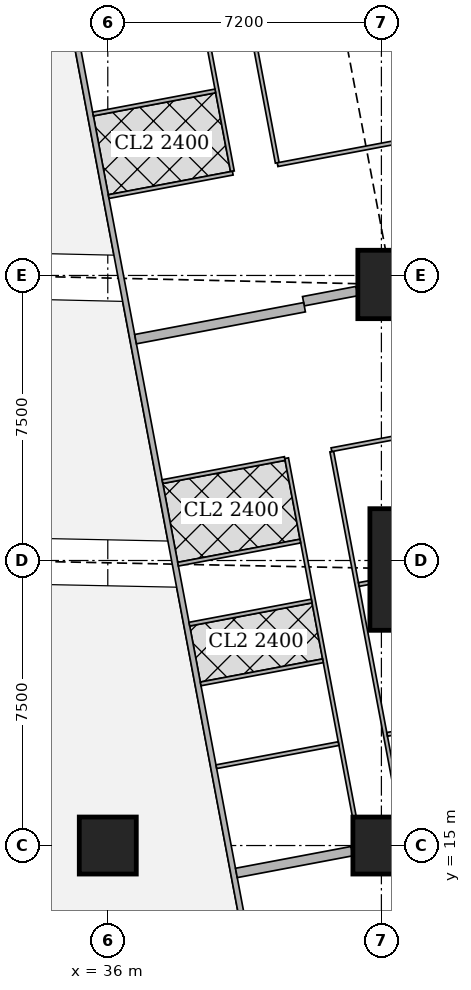
"""IFC4 building model, lengths in metres.
Left out: names, types, materials, properties, quantities, classifications, styles, units other than length and angle.
Written with IfcOpenShell. Run it as: python <this file> out.ifc"""

import sys

from ifc_helpers import new_model, si_unit, direction, frame, frame_2d, origin, origin_2d, place, context, subcontext, project, spatial, rectangle, extrude, element, fill, save


model = new_model("IFC4")
c1 = context("Model", 3, precision=1e-05, world=origin(), true_north=direction((0.0, 1.0)))
c2 = subcontext(c1, "Body", "Model", "MODEL_VIEW")
j1 = project(units=[si_unit("LENGTHUNIT", "METRE"), si_unit("PLANEANGLEUNIT", "RADIAN")], contexts=[c1])
p1 = place(None, origin())
s1 = spatial("IfcSite", under=j1, at=p1, CompositionType="ELEMENT")
p2 = place(p1, origin())
s2 = spatial("IfcBuilding", under=s1, at=p2, CompositionType="ELEMENT")
p3 = place(p2, frame((0.0, 0.0, 147.05)))
s3 = spatial("IfcBuildingStorey", under=s2, at=p3, CompositionType="ELEMENT", Elevation=147.05)
for number, where, z_axis, x_axis in (
    (1, (36.0, 15.0, 0.0), (0.0, 0.0, 1.0), (1.0, 0.0, 0.0)),
    (2, (43.2, 15.0, 0.0), (0.0, 0.0, 1.0), (1.0, 0.0, 0.0)),
):
    element("IfcColumn", number, at=place(p3, frame(where, z_axis=z_axis, x_axis=x_axis)), inside=s3, PredefinedType="COLUMN", context=c2, shape_type="SweptSolid", body=[
        extrude(rectangle(XDim=1.5, YDim=1.5, at=origin_2d()), origin(), (0.0, 0.0, 1.0), 3.75),
    ])
p4 = place(p3, frame((44.697, 22.263, 0.0), z_axis=(0.0, 0.0, 1.0), x_axis=(1.0, 0.0, 0.0)))
e3 = element("IfcColumn", 3, at=p4, inside=s3, PredefinedType="COLUMN", context=c2, shape_type="SweptSolid", body=[
    extrude(rectangle(XDim=3.6, YDim=3.2, at=origin_2d()), origin(), (0.0, 0.0, 1.0), 3.75),
])
p5 = place(p3, frame((43.48, 29.763, 0.0), z_axis=(0.0, 0.0, 1.0), x_axis=(1.0, 0.0, 0.0)))
e4 = element("IfcColumn", 4, at=p5, inside=s3, PredefinedType="COLUMN", context=c2, shape_type="SweptSolid", body=[
    extrude(rectangle(XDim=1.8, YDim=1.8, at=origin_2d()), origin(), (0.0, 0.0, 1.0), 3.75),
])
p6 = place(p3, frame((50.653, 2.703, 0.0), z_axis=(0.0, 0.0, 1.0), x_axis=(-0.185612026696, 0.982623109613, 0.0)))
e5 = element("IfcWall", 5, at=p6, inside=s3, PredefinedType="SOLIDWALL", context=c2, shape_type="SweptSolid", body=[
    extrude(rectangle(XDim=41.393, YDim=0.2, at=frame_2d((20.697, 0.0))), origin(), (0.0, 0.0, 1.0), 3.5),
])
p7 = place(p6, frame((1.633, 0.0, 0.9)))
e6 = element("IfcOpeningElement", 6, at=p7, cuts=e5, PredefinedType="OPENING", context=c2, shape_type="SweptSolid", body=[
    extrude(rectangle(XDim=1.8, YDim=1.5, at=frame_2d((0.9, 0.75))), frame((0.0, 0.11, 0.0), z_axis=(0.0, -1.0, 0.0), x_axis=(1.0, 0.0, 0.0)), (0.0, 0.0, 1.0), 0.22),
])
p8 = place(p6, frame((6.032, 0.0, 0.9)))
e7 = element("IfcOpeningElement", 7, at=p8, cuts=e5, PredefinedType="OPENING", context=c2, shape_type="SweptSolid", body=[
    extrude(rectangle(XDim=1.8, YDim=1.5, at=frame_2d((0.9, 0.75))), frame((0.0, 0.11, 0.0), z_axis=(0.0, -1.0, 0.0), x_axis=(1.0, 0.0, 0.0)), (0.0, 0.0, 1.0), 0.22),
])
p9 = place(p6, frame((9.848, 0.0, 0.9)))
e8 = element("IfcOpeningElement", 8, at=p9, cuts=e5, PredefinedType="OPENING", context=c2, shape_type="SweptSolid", body=[
    extrude(rectangle(XDim=1.8, YDim=1.5, at=frame_2d((0.9, 0.75))), frame((0.0, 0.11, 0.0), z_axis=(0.0, -1.0, 0.0), x_axis=(1.0, 0.0, 0.0)), (0.0, 0.0, 1.0), 0.22),
])
p10 = place(p6, frame((13.664, 0.0, 0.9)))
e9 = element("IfcOpeningElement", 9, at=p10, cuts=e5, PredefinedType="OPENING", context=c2, shape_type="SweptSolid", body=[
    extrude(rectangle(XDim=1.8, YDim=1.5, at=frame_2d((0.9, 0.75))), frame((0.0, 0.11, 0.0), z_axis=(0.0, -1.0, 0.0), x_axis=(1.0, 0.0, 0.0)), (0.0, 0.0, 1.0), 0.22),
])
p11 = place(p6, frame((17.481, 0.0, 0.9)))
e10 = element("IfcOpeningElement", 10, at=p11, cuts=e5, PredefinedType="OPENING", context=c2, shape_type="SweptSolid", body=[
    extrude(rectangle(XDim=1.8, YDim=1.5, at=frame_2d((0.9, 0.75))), frame((0.0, 0.11, 0.0), z_axis=(0.0, -1.0, 0.0), x_axis=(1.0, 0.0, 0.0)), (0.0, 0.0, 1.0), 0.22),
])
p12 = place(p6, frame((21.297, 0.0, 0.9)))
e11 = element("IfcOpeningElement", 11, at=p12, cuts=e5, PredefinedType="OPENING", context=c2, shape_type="SweptSolid", body=[
    extrude(rectangle(XDim=1.8, YDim=1.5, at=frame_2d((0.9, 0.75))), frame((0.0, 0.11, 0.0), z_axis=(0.0, -1.0, 0.0), x_axis=(1.0, 0.0, 0.0)), (0.0, 0.0, 1.0), 0.22),
])
p13 = place(p6, frame((25.113, 0.0, 0.9)))
e12 = element("IfcOpeningElement", 12, at=p13, cuts=e5, PredefinedType="OPENING", context=c2, shape_type="SweptSolid", body=[
    extrude(rectangle(XDim=1.8, YDim=1.5, at=frame_2d((0.9, 0.75))), frame((0.0, 0.11, 0.0), z_axis=(0.0, -1.0, 0.0), x_axis=(1.0, 0.0, 0.0)), (0.0, 0.0, 1.0), 0.22),
])
p14 = place(p6, frame((28.93, 0.0, 0.9)))
e13 = element("IfcOpeningElement", 13, at=p14, cuts=e5, PredefinedType="OPENING", context=c2, shape_type="SweptSolid", body=[
    extrude(rectangle(XDim=1.8, YDim=1.5, at=frame_2d((0.9, 0.75))), frame((0.0, 0.11, 0.0), z_axis=(0.0, -1.0, 0.0), x_axis=(1.0, 0.0, 0.0)), (0.0, 0.0, 1.0), 0.22),
])
p15 = place(p6, frame((32.746, 0.0, 0.9)))
e14 = element("IfcOpeningElement", 14, at=p15, cuts=e5, PredefinedType="OPENING", context=c2, shape_type="SweptSolid", body=[
    extrude(rectangle(XDim=1.8, YDim=1.5, at=frame_2d((0.9, 0.75))), frame((0.0, 0.11, 0.0), z_axis=(0.0, -1.0, 0.0), x_axis=(1.0, 0.0, 0.0)), (0.0, 0.0, 1.0), 0.22),
])
p16 = place(p6, frame((36.481, 0.0, 0.9)))
e15 = element("IfcOpeningElement", 15, at=p16, cuts=e5, PredefinedType="OPENING", context=c2, shape_type="SweptSolid", body=[
    extrude(rectangle(XDim=1.8, YDim=1.5, at=frame_2d((0.9, 0.75))), frame((0.0, 0.11, 0.0), z_axis=(0.0, -1.0, 0.0), x_axis=(1.0, 0.0, 0.0)), (0.0, 0.0, 1.0), 0.22),
])
p17 = place(p3, frame((33.877, 43.029, 0.0), z_axis=(0.0, 0.0, 1.0), x_axis=(0.185596841028, -0.98262597798, 0.0)))
e16 = element("IfcWall", 16, at=p17, inside=s3, PredefinedType="SOLIDWALL", context=c2, shape_type="SweptSolid", body=[
    extrude(rectangle(XDim=41.66, YDim=0.15, at=frame_2d((20.83, 0.0))), origin(), (0.0, 0.0, 1.0), 2.5),
])
p18 = place(p17, frame((12.57, 0.0, 0.0)))
e17 = element("IfcOpeningElement", 17, at=p18, cuts=e16, PredefinedType="OPENING", context=c2, shape_type="SweptSolid", body=[
    extrude(rectangle(XDim=1.0, YDim=2.1, at=frame_2d((0.5, 1.05))), frame((0.0, 0.085, 0.0), z_axis=(0.0, -1.0, 0.0), x_axis=(1.0, 0.0, 0.0)), (0.0, 0.0, 1.0), 0.17),
])
p19 = place(p17, frame((16.386, 0.0, 0.0)))
e18 = element("IfcOpeningElement", 18, at=p19, cuts=e16, PredefinedType="OPENING", context=c2, shape_type="SweptSolid", body=[
    extrude(rectangle(XDim=1.0, YDim=2.1, at=frame_2d((0.5, 1.05))), frame((0.0, 0.085, 0.0), z_axis=(0.0, -1.0, 0.0), x_axis=(1.0, 0.0, 0.0)), (0.0, 0.0, 1.0), 0.17),
])
p20 = place(p17, frame((31.166, 0.0, 0.0)))
e19 = element("IfcOpeningElement", 19, at=p20, cuts=e16, PredefinedType="OPENING", context=c2, shape_type="SweptSolid", body=[
    extrude(rectangle(XDim=1.0, YDim=2.1, at=frame_2d((0.5, 1.05))), frame((0.0, 0.085, 0.0), z_axis=(0.0, -1.0, 0.0), x_axis=(1.0, 0.0, 0.0)), (0.0, 0.0, 1.0), 0.17),
])
p21 = place(p3, frame((38.701, 42.27, 0.0), z_axis=(0.0, 0.0, 1.0), x_axis=(0.185634707842, -0.982618825, 0.0)))
e20 = element("IfcWall", 20, at=p21, inside=s3, PredefinedType="PARTITIONING", context=c2, shape_type="SweptSolid", body=[
    extrude(rectangle(XDim=9.47, YDim=0.1, at=frame_2d((4.735, 0.0))), origin(), (0.0, 0.0, 1.0), 3.5),
])
p22 = place(p21, frame((8.42, 0.0, 0.0)))
e21 = element("IfcOpeningElement", 21, at=p22, cuts=e20, PredefinedType="OPENING", context=c2, shape_type="SweptSolid", body=[
    extrude(rectangle(XDim=0.9, YDim=2.1, at=frame_2d((0.45, 1.05))), frame((0.0, 0.06, 0.0), z_axis=(0.0, -1.0, 0.0), x_axis=(1.0, 0.0, 0.0)), (0.0, 0.0, 1.0), 0.12),
])
p23 = place(p21, frame((4.444, 0.0, 0.0)))
e22 = element("IfcOpeningElement", 22, at=p23, cuts=e20, PredefinedType="OPENING", context=c2, shape_type="SweptSolid", body=[
    extrude(rectangle(XDim=0.9, YDim=2.1, at=frame_2d((0.45, 1.05))), frame((0.0, 0.06, 0.0), z_axis=(0.0, -1.0, 0.0), x_axis=(1.0, 0.0, 0.0)), (0.0, 0.0, 1.0), 0.12),
])
p24 = place(p3, frame((37.411, 42.638, 0.0), z_axis=(0.0, 0.0, 1.0), x_axis=(0.185485587071, -0.982646984928, 0.0)))
e23 = element("IfcWall", 23, at=p24, inside=s3, PredefinedType="PARTITIONING", context=c2, shape_type="SweptSolid", body=[
    extrude(rectangle(XDim=10.072, YDim=0.1, at=frame_2d((5.036, 0.0))), origin(), (0.0, 0.0, 1.0), 3.5),
])
p25 = place(p24, frame((8.567, 0.0, 0.0)))
e24 = element("IfcOpeningElement", 24, at=p25, cuts=e23, PredefinedType="OPENING", context=c2, shape_type="SweptSolid", body=[
    extrude(rectangle(XDim=0.9, YDim=2.1, at=frame_2d((0.45, 1.05))), frame((0.0, 0.06, 0.0), z_axis=(0.0, -1.0, 0.0), x_axis=(1.0, 0.0, 0.0)), (0.0, 0.0, 1.0), 0.12),
])
p26 = place(p24, frame((3.188, 0.0, 0.0)))
e25 = element("IfcOpeningElement", 25, at=p26, cuts=e23, PredefinedType="OPENING", context=c2, shape_type="SweptSolid", body=[
    extrude(rectangle(XDim=0.9, YDim=2.1, at=frame_2d((0.45, 1.05))), frame((0.0, 0.06, 0.0), z_axis=(0.0, -1.0, 0.0), x_axis=(1.0, 0.0, 0.0)), (0.0, 0.0, 1.0), 0.12),
])
p27 = place(p24, frame((1.129, 0.0, 0.0)))
e26 = element("IfcOpeningElement", 26, at=p27, cuts=e23, PredefinedType="OPENING", context=c2, shape_type="SweptSolid", body=[
    extrude(rectangle(XDim=0.9, YDim=2.1, at=frame_2d((0.45, 1.05))), frame((0.0, 0.06, 0.0), z_axis=(0.0, -1.0, 0.0), x_axis=(1.0, 0.0, 0.0)), (0.0, 0.0, 1.0), 0.12),
])
p28 = place(p24, frame((5.899, 0.0, 0.0)))
e27 = element("IfcOpeningElement", 27, at=p28, cuts=e23, PredefinedType="OPENING", context=c2, shape_type="SweptSolid", body=[
    extrude(rectangle(XDim=0.9, YDim=2.1, at=frame_2d((0.45, 1.05))), frame((0.0, 0.06, 0.0), z_axis=(0.0, -1.0, 0.0), x_axis=(1.0, 0.0, 0.0)), (0.0, 0.0, 1.0), 0.12),
])
p29 = place(p3, frame((44.693, 33.713, 0.0), z_axis=(0.0, 0.0, 1.0), x_axis=(-0.982633535512, -0.185556823879, 0.0)))
e28 = element("IfcWall", 28, at=p29, inside=s3, PredefinedType="PARTITIONING", context=c2, shape_type="SweptSolid", body=[
    extrude(rectangle(XDim=4.3, YDim=0.1, at=frame_2d((2.15, 0.0))), origin(), (0.0, 0.0, 1.0), 2.1),
])
p30 = place(p3, frame((39.289, 32.692, 0.0), z_axis=(0.0, 0.0, 1.0), x_axis=(-0.982633623707, -0.185556356831, 0.0)))
e29 = element("IfcWall", 29, at=p30, inside=s3, PredefinedType="PARTITIONING", context=c2, shape_type="SweptSolid", body=[
    extrude(rectangle(XDim=3.325, YDim=0.1, at=frame_2d((1.663, 0.0))), origin(), (0.0, 0.0, 1.0), 3.5),
])
p31 = place(p3, frame((38.829, 34.855, 0.0), z_axis=(0.0, 0.0, 1.0), x_axis=(-0.982610347627, -0.185679575441, 0.0)))
e30 = element("IfcWall", 30, at=p31, inside=s3, PredefinedType="PARTITIONING", context=c2, shape_type="SweptSolid", body=[
    extrude(rectangle(XDim=3.274, YDim=0.1, at=frame_2d((1.637, 0.0))), origin(), (0.0, 0.0, 1.0), 3.5),
])
p32 = place(p3, frame((41.894, 25.366, 0.0), z_axis=(0.0, 0.0, 1.0), x_axis=(0.1856544654, -0.982615092229, 0.0)))
e31 = element("IfcWall", 31, at=p32, inside=s3, PredefinedType="PARTITIONING", context=c2, shape_type="SweptSolid", body=[
    extrude(rectangle(XDim=9.776, YDim=0.1, at=frame_2d((4.888, 0.0))), origin(), (0.0, 0.0, 1.0), 2.5),
])
p33 = place(p32, frame((0.151, 0.0, 0.0)))
e32 = element("IfcOpeningElement", 32, at=p33, cuts=e31, PredefinedType="OPENING", context=c2, shape_type="SweptSolid", body=[
    extrude(rectangle(XDim=0.9, YDim=2.1, at=frame_2d((0.45, 1.05))), frame((0.0, 0.06, 0.0), z_axis=(0.0, -1.0, 0.0), x_axis=(1.0, 0.0, 0.0)), (0.0, 0.0, 1.0), 0.12),
])
p34 = place(p32, frame((5.05, 0.0, 0.0)))
e33 = element("IfcOpeningElement", 33, at=p34, cuts=e31, PredefinedType="OPENING", context=c2, shape_type="SweptSolid", body=[
    extrude(rectangle(XDim=0.9, YDim=2.1, at=frame_2d((0.45, 1.05))), frame((0.0, 0.06, 0.0), z_axis=(0.0, -1.0, 0.0), x_axis=(1.0, 0.0, 0.0)), (0.0, 0.0, 1.0), 0.12),
])
p35 = place(p32, frame((7.783, 0.0, 0.0)))
e34 = element("IfcOpeningElement", 34, at=p35, cuts=e31, PredefinedType="OPENING", context=c2, shape_type="SweptSolid", body=[
    extrude(rectangle(XDim=0.9, YDim=2.1, at=frame_2d((0.45, 1.05))), frame((0.0, 0.06, 0.0), z_axis=(0.0, -1.0, 0.0), x_axis=(1.0, 0.0, 0.0)), (0.0, 0.0, 1.0), 0.12),
])
p36 = place(p3, frame((40.706, 25.192, 0.0), z_axis=(0.0, 0.0, 1.0), x_axis=(0.185610321375, -0.982623431737, 0.0)))
e35 = element("IfcWall", 35, at=p36, inside=s3, PredefinedType="PARTITIONING", context=c2, shape_type="SweptSolid", body=[
    extrude(rectangle(XDim=9.601, YDim=0.1, at=frame_2d((4.8, 0.0))), origin(), (0.0, 0.0, 1.0), 2.5),
])
p37 = place(p36, frame((0.655, 0.0, 0.0)))
e36 = element("IfcOpeningElement", 36, at=p37, cuts=e35, PredefinedType="OPENING", context=c2, shape_type="SweptSolid", body=[
    extrude(rectangle(XDim=0.9, YDim=2.1, at=frame_2d((0.45, 1.05))), frame((0.0, 0.06, 0.0), z_axis=(0.0, -1.0, 0.0), x_axis=(1.0, 0.0, 0.0)), (0.0, 0.0, 1.0), 0.12),
])
p38 = place(p36, frame((4.166, 0.0, 0.0)))
e37 = element("IfcOpeningElement", 37, at=p38, cuts=e35, PredefinedType="OPENING", context=c2, shape_type="SweptSolid", body=[
    extrude(rectangle(XDim=0.9, YDim=2.1, at=frame_2d((0.45, 1.05))), frame((0.0, 0.06, 0.0), z_axis=(0.0, -1.0, 0.0), x_axis=(1.0, 0.0, 0.0)), (0.0, 0.0, 1.0), 0.12),
])
p39 = place(p36, frame((2.563, 0.0, 0.0)))
e38 = element("IfcOpeningElement", 38, at=p39, cuts=e35, PredefinedType="OPENING", context=c2, shape_type="SweptSolid", body=[
    extrude(rectangle(XDim=0.9, YDim=2.1, at=frame_2d((0.45, 1.05))), frame((0.0, 0.06, 0.0), z_axis=(0.0, -1.0, 0.0), x_axis=(1.0, 0.0, 0.0)), (0.0, 0.0, 1.0), 0.12),
])
p40 = place(p36, frame((6.074, 0.0, 0.0)))
e39 = element("IfcOpeningElement", 39, at=p40, cuts=e35, PredefinedType="OPENING", context=c2, shape_type="SweptSolid", body=[
    extrude(rectangle(XDim=0.9, YDim=2.1, at=frame_2d((0.45, 1.05))), frame((0.0, 0.06, 0.0), z_axis=(0.0, -1.0, 0.0), x_axis=(1.0, 0.0, 0.0)), (0.0, 0.0, 1.0), 0.12),
])
p41 = place(p3, frame((46.11, 26.213, 0.0), z_axis=(0.0, 0.0, 1.0), x_axis=(-0.982633535512, -0.185556823879, 0.0)))
e40 = element("IfcWall", 40, at=p41, inside=s3, PredefinedType="PARTITIONING", context=c2, shape_type="SweptSolid", body=[
    extrude(rectangle(XDim=4.3, YDim=0.1, at=frame_2d((2.15, 0.0))), origin(), (0.0, 0.0, 1.0), 2.1),
])
p42 = place(p3, frame((42.887, 21.921, 0.0), z_axis=(0.0, 0.0, 1.0), x_axis=(-0.982688058078, -0.185267861514, 0.0)))
e41 = element("IfcWall", 41, at=p42, inside=s3, PredefinedType="PARTITIONING", context=c2, shape_type="SweptSolid", body=[
    extrude(rectangle(XDim=0.286, YDim=0.1, at=frame_2d((0.143, 0.0))), origin(), (0.0, 0.0, 1.0), 2.5),
])
p43 = place(p3, frame((47.527, 18.712, 0.0), z_axis=(0.0, 0.0, 1.0), x_axis=(-0.982665405803, -0.185387972203, 0.0)))
e42 = element("IfcWall", 42, at=p43, inside=s3, PredefinedType="PARTITIONING", context=c2, shape_type="SweptSolid", body=[
    extrude(rectangle(XDim=4.25, YDim=0.1, at=frame_2d((2.125, 0.0))), origin(), (0.0, 0.0, 1.0), 2.1),
])
for number, where, z_axis, x_axis in (
    (43, (40.657, 25.183, 0.0), (0.0, 0.0, 1.0), (-0.983, -0.186, 0.0)),
    (44, (41.365, 21.433, 0.0), (0.0, 0.0, 1.0), (-0.983, -0.186, 0.0)),
):
    element("IfcWall", number, at=place(p3, frame(where, z_axis=z_axis, x_axis=x_axis)), inside=s3, PredefinedType="PARTITIONING", context=c2, shape_type="SweptSolid", body=[
        extrude(rectangle(XDim=3.275, YDim=0.1, at=frame_2d((1.637, 0.0))), origin(), (0.0, 0.0, 1.0), 3.5),
    ])
p44 = place(p3, frame((42.073, 17.682, 0.0), z_axis=(0.0, 0.0, 1.0), x_axis=(-0.982610347627, -0.185679575441, 0.0)))
e45 = element("IfcWall", 45, at=p44, inside=s3, PredefinedType="PARTITIONING", context=c2, shape_type="SweptSolid", body=[
    extrude(rectangle(XDim=3.274, YDim=0.1, at=frame_2d((1.637, 0.0))), origin(), (0.0, 0.0, 1.0), 3.5),
])
p45 = place(p44, frame((1.2, 0.0, 0.0)))
e46 = element("IfcOpeningElement", 46, at=p45, cuts=e45, PredefinedType="OPENING", context=c2, shape_type="SweptSolid", body=[
    extrude(rectangle(XDim=0.9, YDim=2.1, at=frame_2d((0.45, 1.05))), frame((0.0, 0.06, 0.0), z_axis=(0.0, -1.0, 0.0), x_axis=(1.0, 0.0, 0.0)), (0.0, 0.0, 1.0), 0.12),
])
p46 = place(p3, frame((41.067, 23.011, 0.0), z_axis=(0.0, 0.0, 1.0), x_axis=(-0.982618057925, -0.185638768151, 0.0)))
e47 = element("IfcWall", 47, at=p46, inside=s3, PredefinedType="PARTITIONING", context=c2, shape_type="SweptSolid", body=[
    extrude(rectangle(XDim=3.275, YDim=0.1, at=frame_2d((1.637, 0.0))), origin(), (0.0, 0.0, 1.0), 2.5),
])
p47 = place(p3, frame((41.662, 19.861, 0.0), z_axis=(0.0, 0.0, 1.0), x_axis=(-0.982607026909, -0.185697147715, 0.0)))
e48 = element("IfcWall", 48, at=p47, inside=s3, PredefinedType="PARTITIONING", context=c2, shape_type="SweptSolid", body=[
    extrude(rectangle(XDim=3.275, YDim=0.1, at=frame_2d((1.637, 0.0))), origin(), (0.0, 0.0, 1.0), 3.5),
])
p48 = place(p3, frame((42.556, 29.589, 0.0), z_axis=(0.0, 0.0, 1.0), x_axis=(-0.982502104561, -0.18625148196, 0.0)))
e49 = element("IfcWall", 49, at=p48, inside=s3, PredefinedType="SOLIDWALL", context=c2, shape_type="SweptSolid", body=[
    extrude(rectangle(XDim=1.434, YDim=0.25, at=frame_2d((0.717, 0.0))), origin(), (0.0, 0.0, 1.0), 2.1),
])
p49 = place(p3, frame((41.177, 29.164, 0.0), z_axis=(0.0, 0.0, 1.0), x_axis=(-0.982612837616, -0.185666398014, 0.0)))
e50 = element("IfcWall", 50, at=p49, inside=s3, PredefinedType="SOLIDWALL", context=c2, shape_type="SweptSolid", body=[
    extrude(rectangle(XDim=4.525, YDim=0.25, at=frame_2d((2.262, 0.0))), origin(), (0.0, 0.0, 1.0), 2.5),
])
p50 = place(p3, frame((42.426, 14.853, 0.0), z_axis=(0.0, 0.0, 1.0), x_axis=(-0.982660840416, -0.185412169809, 0.0)))
e51 = element("IfcWall", 51, at=p50, inside=s3, PredefinedType="SOLIDWALL", context=c2, shape_type="SweptSolid", body=[
    extrude(rectangle(XDim=3.096, YDim=0.25, at=frame_2d((1.548, 0.0))), origin(), (0.0, 0.0, 1.0), 3.5),
])
p51 = place(p3, frame((34.638, 10.174, 0.0), z_axis=(0.0, 0.0, 1.0), x_axis=(-0.185583626094, 0.982628473903, 0.0)))
e52 = element("IfcWall", 52, at=p51, inside=s3, PredefinedType="PARTITIONING", context=c2, shape_type="SweptSolid", body=[
    extrude(rectangle(XDim=11.767, YDim=0.125, at=frame_2d((5.884, 0.0))), origin(), (0.0, 0.0, 1.0), 3.5),
])
p52 = place(p51, frame((0.697, 0.0, 0.0)))
e53 = element("IfcOpeningElement", 53, at=p52, cuts=e52, PredefinedType="OPENING", context=c2, shape_type="SweptSolid", body=[
    extrude(rectangle(XDim=1.0, YDim=2.1, at=frame_2d((0.5, 1.05))), frame((0.0, 0.073, 0.0), z_axis=(0.0, -1.0, 0.0), x_axis=(1.0, 0.0, 0.0)), (0.0, 0.0, 1.0), 0.145),
])
p53 = place(p51, frame((5.734, 0.0, 0.0)))
e54 = element("IfcOpeningElement", 54, at=p53, cuts=e52, PredefinedType="OPENING", context=c2, shape_type="SweptSolid", body=[
    extrude(rectangle(XDim=1.0, YDim=2.1, at=frame_2d((0.5, 1.05))), frame((0.0, 0.073, 0.0), z_axis=(0.0, -1.0, 0.0), x_axis=(1.0, 0.0, 0.0)), (0.0, 0.0, 1.0), 0.145),
])
p54 = place(p22, origin())
e55 = element("IfcDoor", 55, at=p54, inside=s3, OperationType="SINGLE_SWING_RIGHT", PredefinedType="DOOR", context=c2, shape_type="SweptSolid", body=[
    extrude(rectangle(XDim=0.9, YDim=2.1, at=frame_2d((0.45, 1.05))), frame((0.0, 0.025, 0.0), z_axis=(0.0, -1.0, 0.0), x_axis=(1.0, 0.0, 0.0)), (0.0, 0.0, 1.0), 0.05),
])
fill(e21, e55)
p55 = place(p25, origin())
e56 = element("IfcDoor", 56, at=p55, inside=s3, OperationType="SINGLE_SWING_LEFT", PredefinedType="DOOR", context=c2, shape_type="SweptSolid", body=[
    extrude(rectangle(XDim=0.9, YDim=2.1, at=frame_2d((0.45, 1.05))), frame((0.0, 0.025, 0.0), z_axis=(0.0, -1.0, 0.0), x_axis=(1.0, 0.0, 0.0)), (0.0, 0.0, 1.0), 0.05),
])
fill(e24, e56)
p56 = place(p18, origin())
e57 = element("IfcDoor", 57, at=p56, inside=s3, OperationType="SINGLE_SWING_RIGHT", PredefinedType="DOOR", context=c2, shape_type="SweptSolid", body=[
    extrude(rectangle(XDim=1.0, YDim=2.1, at=frame_2d((0.5, 1.05))), frame((0.0, 0.025, 0.0), z_axis=(0.0, -1.0, 0.0), x_axis=(1.0, 0.0, 0.0)), (0.0, 0.0, 1.0), 0.05),
])
fill(e17, e57)
p57 = place(p33, origin())
e58 = element("IfcDoor", 58, at=p57, inside=s3, OperationType="SINGLE_SWING_LEFT", PredefinedType="DOOR", context=c2, shape_type="SweptSolid", body=[
    extrude(rectangle(XDim=0.9, YDim=2.1, at=frame_2d((0.45, 1.05))), frame((0.0, 0.025, 0.0), z_axis=(0.0, -1.0, 0.0), x_axis=(1.0, 0.0, 0.0)), (0.0, 0.0, 1.0), 0.05),
])
fill(e32, e58)
p58 = place(p34, origin())
e59 = element("IfcDoor", 59, at=p58, inside=s3, OperationType="SINGLE_SWING_LEFT", PredefinedType="DOOR", context=c2, shape_type="SweptSolid", body=[
    extrude(rectangle(XDim=0.9, YDim=2.1, at=frame_2d((0.45, 1.05))), frame((0.0, 0.025, 0.0), z_axis=(0.0, -1.0, 0.0), x_axis=(1.0, 0.0, 0.0)), (0.0, 0.0, 1.0), 0.05),
])
fill(e33, e59)
p59 = place(p35, origin())
e60 = element("IfcDoor", 60, at=p59, inside=s3, OperationType="SINGLE_SWING_LEFT", PredefinedType="DOOR", context=c2, shape_type="SweptSolid", body=[
    extrude(rectangle(XDim=0.9, YDim=2.1, at=frame_2d((0.45, 1.05))), frame((0.0, 0.025, 0.0), z_axis=(0.0, -1.0, 0.0), x_axis=(1.0, 0.0, 0.0)), (0.0, 0.0, 1.0), 0.05),
])
fill(e34, e60)
p60 = place(p37, origin())
e61 = element("IfcDoor", 61, at=p60, inside=s3, OperationType="SINGLE_SWING_RIGHT", PredefinedType="DOOR", context=c2, shape_type="SweptSolid", body=[
    extrude(rectangle(XDim=0.9, YDim=2.1, at=frame_2d((0.45, 1.05))), frame((0.0, 0.025, 0.0), z_axis=(0.0, -1.0, 0.0), x_axis=(1.0, 0.0, 0.0)), (0.0, 0.0, 1.0), 0.05),
])
fill(e36, e61)
p61 = place(p38, origin())
e62 = element("IfcDoor", 62, at=p61, inside=s3, OperationType="SINGLE_SWING_RIGHT", PredefinedType="DOOR", context=c2, shape_type="SweptSolid", body=[
    extrude(rectangle(XDim=0.9, YDim=2.1, at=frame_2d((0.45, 1.05))), frame((0.0, 0.025, 0.0), z_axis=(0.0, -1.0, 0.0), x_axis=(1.0, 0.0, 0.0)), (0.0, 0.0, 1.0), 0.05),
])
fill(e37, e62)
p62 = place(p39, origin())
e63 = element("IfcDoor", 63, at=p62, inside=s3, OperationType="SINGLE_SWING_RIGHT", PredefinedType="DOOR", context=c2, shape_type="SweptSolid", body=[
    extrude(rectangle(XDim=0.9, YDim=2.1, at=frame_2d((0.45, 1.05))), frame((0.0, 0.025, 0.0), z_axis=(0.0, -1.0, 0.0), x_axis=(1.0, 0.0, 0.0)), (0.0, 0.0, 1.0), 0.05),
])
fill(e38, e63)
p63 = place(p40, origin())
e64 = element("IfcDoor", 64, at=p63, inside=s3, OperationType="SINGLE_SWING_LEFT", PredefinedType="DOOR", context=c2, shape_type="SweptSolid", body=[
    extrude(rectangle(XDim=0.9, YDim=2.1, at=frame_2d((0.45, 1.05))), frame((0.0, 0.025, 0.0), z_axis=(0.0, -1.0, 0.0), x_axis=(1.0, 0.0, 0.0)), (0.0, 0.0, 1.0), 0.05),
])
fill(e39, e64)
p64 = place(p19, origin())
e65 = element("IfcDoor", 65, at=p64, inside=s3, OperationType="SINGLE_SWING_LEFT", PredefinedType="DOOR", context=c2, shape_type="SweptSolid", body=[
    extrude(rectangle(XDim=1.0, YDim=2.1, at=frame_2d((0.5, 1.05))), frame((0.0, 0.025, 0.0), z_axis=(0.0, -1.0, 0.0), x_axis=(1.0, 0.0, 0.0)), (0.0, 0.0, 1.0), 0.05),
])
fill(e18, e65)
p65 = place(p45, origin())
e66 = element("IfcDoor", 66, at=p65, inside=s3, OperationType="SINGLE_SWING_RIGHT", PredefinedType="DOOR", context=c2, shape_type="SweptSolid", body=[
    extrude(rectangle(XDim=0.9, YDim=2.1, at=frame_2d((0.45, 1.05))), frame((0.0, 0.025, 0.0), z_axis=(0.0, -1.0, 0.0), x_axis=(1.0, 0.0, 0.0)), (0.0, 0.0, 1.0), 0.05),
])
fill(e46, e66)
save(model, sys.argv[1])
